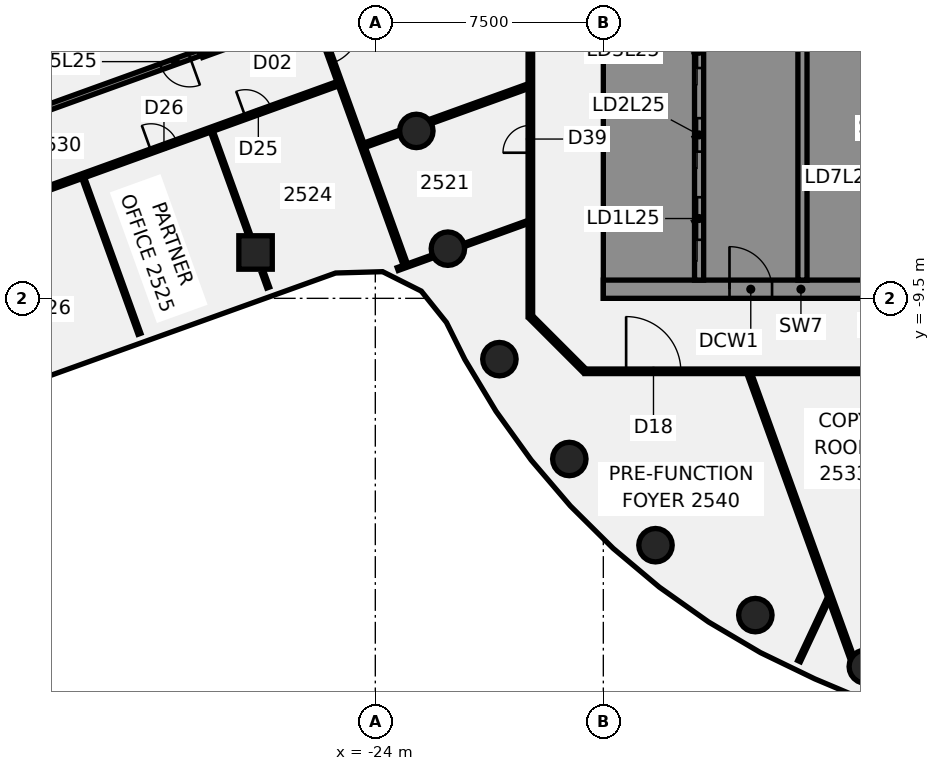
"""IFC4 building model, lengths in metres.
Left out: names, types, materials, properties, quantities, classifications, styles, units other than length and angle.
Written with IfcOpenShell. Run it as: python <this file> out.ifc"""

import sys

from ifc_helpers import new_model, si_unit, direction, frame, frame_2d, origin, origin_2d, place, context, subcontext, project, spatial, polyline, rectangle, circle, outline, extrude, element, fill, save


model = new_model("IFC4")
c1 = context("Model", 3, precision=1e-05, world=origin(), true_north=direction((0.0, 1.0)))
c2 = subcontext(c1, "Body", "Model", "MODEL_VIEW")
j1 = project(units=[si_unit("LENGTHUNIT", "METRE"), si_unit("PLANEANGLEUNIT", "RADIAN")], contexts=[c1])
p1 = place(None, origin())
s1 = spatial("IfcSite", under=j1, at=p1, CompositionType="ELEMENT")
p2 = place(p1, origin())
s2 = spatial("IfcBuilding", under=s1, at=p2, CompositionType="ELEMENT")
p3 = place(p2, frame((0.0, 0.0, 106.0)))
s3 = spatial("IfcBuildingStorey", under=s2, at=p3, CompositionType="ELEMENT", Elevation=106.0)
for number, where, z_axis, x_axis in (
    (1, (-22.651, -3.994, -0.14), (0.0, 0.0, 1.0), (1.0, 0.0, 0.0)),
    (2, (-21.613, -7.866, -0.14), (0.0, 0.0, 1.0), (1.0, 0.0, 0.0)),
    (3, (-19.919, -11.5, -0.14), (0.0, 0.0, 1.0), (1.0, 0.0, 0.0)),
    (4, (-17.619, -14.784, -0.14), (0.0, 0.0, 1.0), (1.0, 0.0, 0.0)),
    (5, (-14.784, -17.619, -0.14), (0.0, 0.0, 1.0), (1.0, 0.0, 0.0)),
    (6, (-11.5, -19.919, -0.14), (0.0, 0.0, 1.0), (1.0, 0.0, 0.0)),
    (7, (-7.866, -21.613, -0.14), (0.0, 0.0, 1.0), (1.0, 0.0, 0.0)),
):
    element("IfcColumn", number, at=place(p3, frame(where, z_axis=z_axis, x_axis=x_axis)), inside=s3, PredefinedType="COLUMN", context=c2, shape_type="SweptSolid", body=[
        extrude(circle(Radius=0.55, at=origin_2d()), origin(), (0.0, 0.0, 1.0), 3.75),
    ])
p4 = place(p3, frame((-27.939, -7.992, -0.139), z_axis=(0.039044792498, -0.028502698523, 0.998830866742), x_axis=(-0.338245964432, 0.940205035525, 0.040051950239)))
e8 = element("IfcColumn", 8, at=p4, inside=s3, PredefinedType="COLUMN", context=c2, shape_type="SweptSolid", body=[
    extrude(rectangle(XDim=1.1, YDim=1.1, at=origin_2d()), origin(), (0.0, 0.0, 1.0), 3.752),
])
p5 = place(p3, frame((-33.606, -5.545, 0.0), z_axis=(0.0, 0.0, 1.0), x_axis=(0.339516614383, -0.940600057707, 0.0)))
e9 = element("IfcWall", 9, at=p5, inside=s3, PredefinedType="PARTITIONING", context=c2, shape_type="SweptSolid", body=[
    extrude(rectangle(XDim=5.443, YDim=0.1, at=frame_2d((2.722, 0.0))), origin(), (0.0, 0.0, 1.0), 3.01),
])
p6 = place(p3, frame((-29.374, -4.018, 0.0), z_axis=(0.0, 0.0, 1.0), x_axis=(0.339511197123, -0.94060201309, 0.0)))
e10 = element("IfcWall", 10, at=p6, inside=s3, PredefinedType="PARTITIONING", context=c2, shape_type="SweptSolid", body=[
    extrude(rectangle(XDim=3.646, YDim=0.1, at=frame_2d((1.823, 0.0))), origin(), (0.0, 0.0, 1.0), 3.01),
])
p7 = place(p3, frame((-27.695, -8.669, 0.0), z_axis=(0.0, 0.0, 1.0), x_axis=(0.339061997741, -0.940764030822, 0.0)))
e11 = element("IfcWall", 11, at=p7, inside=s3, PredefinedType="PARTITIONING", context=c2, shape_type="SweptSolid", body=[
    extrude(rectangle(XDim=0.505, YDim=0.1, at=frame_2d((0.252, 0.0))), origin(), (0.0, 0.0, 1.0), 3.01),
])
p8 = place(p3, frame((-27.849, 5.01, 0.0), z_axis=(0.0, 0.0, 1.0), x_axis=(0.339486516138, -0.940610921349, 0.0)))
e12 = element("IfcWall", 12, at=p8, inside=s3, PredefinedType="PARTITIONING", context=c2, shape_type="SweptSolid", body=[
    extrude(rectangle(XDim=14.244, YDim=0.15, at=frame_2d((7.122, 0.0))), origin(), (0.0, 0.0, 1.0), 3.01),
])
p9 = place(p8, frame((5.799, 0.0, 0.0)))
e13 = element("IfcOpeningElement", 13, at=p9, cuts=e12, PredefinedType="OPENING", context=c2, shape_type="SweptSolid", body=[
    extrude(rectangle(XDim=1.4, YDim=2.1, at=frame_2d((0.7, 1.05))), frame((0.0, 0.085, 0.0), z_axis=(0.0, -1.0, 0.0), x_axis=(1.0, 0.0, 0.0)), (0.0, 0.0, 1.0), 0.17),
])
p10 = place(p3, frame((-11.696, -11.985, 0.0), z_axis=(0.0, 0.0, 1.0), x_axis=(0.339658380715, -0.940548874015, 0.0)))
e14 = element("IfcWall", 14, at=p10, inside=s3, PredefinedType="PARTITIONING", context=c2, shape_type="SweptSolid", body=[
    extrude(rectangle(XDim=9.915, YDim=0.15, at=frame_2d((4.958, 0.0))), origin(), (0.0, 0.0, 1.0), 3.01),
])
p11 = place(p3, frame((-18.872, -10.128, 0.0), z_axis=(0.0, 0.0, 1.0), x_axis=(0.707106781187, -0.707106781187, 0.0)))
e15 = element("IfcWall", 15, at=p11, inside=s3, PredefinedType="PARTITIONING", context=c2, shape_type="SweptSolid", body=[
    extrude(rectangle(XDim=2.465, YDim=0.15, at=frame_2d((1.232, 0.0))), origin(), (0.0, 0.0, 1.0), 3.01),
])
p12 = place(p3, frame((-17.1, -11.9, 0.0), z_axis=(0.0, 0.0, 1.0), x_axis=(1.0, 0.0, 0.0)))
e16 = element("IfcWall", 16, at=p12, inside=s3, PredefinedType="PARTITIONING", context=c2, shape_type="SweptSolid", body=[
    extrude(rectangle(XDim=34.165, YDim=0.15, at=frame_2d((17.083, 0.0))), origin(), (0.0, 0.0, 1.0), 3.01),
])
p13 = place(p12, frame((12.539, 0.0, 0.0)))
e17 = element("IfcOpeningElement", 17, at=p13, cuts=e16, PredefinedType="OPENING", context=c2, shape_type="SweptSolid", body=[
    extrude(rectangle(XDim=1.8, YDim=2.1, at=frame_2d((0.9, 1.05))), frame((0.0, 0.085, 0.0), z_axis=(0.0, -1.0, 0.0), x_axis=(1.0, 0.0, 0.0)), (0.0, 0.0, 1.0), 0.17),
])
p14 = place(p12, frame((1.35, 0.0, 0.0)))
e18 = element("IfcOpeningElement", 18, at=p14, cuts=e16, PredefinedType="OPENING", context=c2, shape_type="SweptSolid", body=[
    extrude(rectangle(XDim=1.8, YDim=2.1, at=frame_2d((0.9, 1.05))), frame((0.0, 0.085, 0.0), z_axis=(0.0, -1.0, 0.0), x_axis=(1.0, 0.0, 0.0)), (0.0, 0.0, 1.0), 0.17),
])
p15 = place(p12, frame((26.934, 0.0, 0.0)))
e19 = element("IfcOpeningElement", 19, at=p15, cuts=e16, PredefinedType="OPENING", context=c2, shape_type="SweptSolid", body=[
    extrude(rectangle(XDim=1.8, YDim=2.1, at=frame_2d((0.9, 1.05))), frame((0.0, 0.085, 0.0), z_axis=(0.0, -1.0, 0.0), x_axis=(1.0, 0.0, 0.0)), (0.0, 0.0, 1.0), 0.17),
])
p16 = place(p3, frame((-29.706, -1.507, 0.0), z_axis=(0.0, 0.0, 1.0), x_axis=(0.940581781259, 0.339567243361, 0.0)))
e20 = element("IfcWall", 20, at=p16, inside=s3, PredefinedType="PARTITIONING", context=c2, shape_type="SweptSolid", body=[
    extrude(rectangle(XDim=3.885, YDim=0.15, at=frame_2d((1.942, 0.0))), origin(), (0.0, 0.0, 1.0), 3.01),
])
p17 = place(p16, frame((1.95, 0.0, 0.0)))
e21 = element("IfcOpeningElement", 21, at=p17, cuts=e20, PredefinedType="OPENING", context=c2, shape_type="SweptSolid", body=[
    extrude(rectangle(XDim=0.9, YDim=2.1, at=frame_2d((0.45, 1.05))), frame((0.0, 0.085, 0.0), z_axis=(0.0, -1.0, 0.0), x_axis=(1.0, 0.0, 0.0)), (0.0, 0.0, 1.0), 0.17),
])
p18 = place(p3, frame((-42.027, -8.507, 0.0), z_axis=(0.0, 0.0, 1.0), x_axis=(0.940523059572, 0.33972985505, 0.0)))
e22 = element("IfcWall", 22, at=p18, inside=s3, PredefinedType="PARTITIONING", context=c2, shape_type="SweptSolid", body=[
    extrude(rectangle(XDim=17.845, YDim=0.15, at=frame_2d((8.922, 0.0))), origin(), (0.0, 0.0, 1.0), 3.01),
])
p19 = place(p18, frame((14.625, 0.0, 0.0)))
e23 = element("IfcOpeningElement", 23, at=p19, cuts=e22, PredefinedType="OPENING", context=c2, shape_type="SweptSolid", body=[
    extrude(rectangle(XDim=0.9, YDim=2.1, at=frame_2d((0.45, 1.05))), frame((0.0, 0.085, 0.0), z_axis=(0.0, -1.0, 0.0), x_axis=(1.0, 0.0, 0.0)), (0.0, 0.0, 1.0), 0.17),
])
p20 = place(p18, frame((11.325, 0.0, 0.0)))
e24 = element("IfcOpeningElement", 24, at=p20, cuts=e22, PredefinedType="OPENING", context=c2, shape_type="SweptSolid", body=[
    extrude(rectangle(XDim=0.9, YDim=2.1, at=frame_2d((0.45, 1.05))), frame((0.0, 0.085, 0.0), z_axis=(0.0, -1.0, 0.0), x_axis=(1.0, 0.0, 0.0)), (0.0, 0.0, 1.0), 0.17),
])
p21 = place(p18, frame((5.626, 0.0, 0.0)))
e25 = element("IfcOpeningElement", 25, at=p21, cuts=e22, PredefinedType="OPENING", context=c2, shape_type="SweptSolid", body=[
    extrude(rectangle(XDim=0.9, YDim=2.1, at=frame_2d((0.45, 1.05))), frame((0.0, 0.085, 0.0), z_axis=(0.0, -1.0, 0.0), x_axis=(1.0, 0.0, 0.0)), (0.0, 0.0, 1.0), 0.17),
])
p22 = place(p18, frame((2.325, 0.0, 0.0)))
e26 = element("IfcOpeningElement", 26, at=p22, cuts=e22, PredefinedType="OPENING", context=c2, shape_type="SweptSolid", body=[
    extrude(rectangle(XDim=0.9, YDim=2.1, at=frame_2d((0.45, 1.05))), frame((0.0, 0.085, 0.0), z_axis=(0.0, -1.0, 0.0), x_axis=(1.0, 0.0, 0.0)), (0.0, 0.0, 1.0), 0.17),
])
p23 = place(p3, frame((-24.35, -4.462, 0.0), z_axis=(0.0, 0.0, 1.0), x_axis=(0.940651064029, 0.33937527273, 0.0)))
e27 = element("IfcWall", 27, at=p23, inside=s3, PredefinedType="PARTITIONING", context=c2, shape_type="SweptSolid", body=[
    extrude(rectangle(XDim=1.226, YDim=0.15, at=frame_2d((0.613, 0.0))), origin(), (0.0, 0.0, 1.0), 3.01),
])
p24 = place(p3, frame((-22.195, -3.685, 0.0), z_axis=(0.0, 0.0, 1.0), x_axis=(0.94064274641, 0.339398325903, 0.0)))
e28 = element("IfcWall", 28, at=p24, inside=s3, PredefinedType="PARTITIONING", context=c2, shape_type="SweptSolid", body=[
    extrude(rectangle(XDim=3.413, YDim=0.15, at=frame_2d((1.706, 0.0))), origin(), (0.0, 0.0, 1.0), 3.01),
])
p25 = place(p3, frame((-23.263, -8.536, 0.0), z_axis=(0.0, 0.0, 1.0), x_axis=(0.940619022918, 0.339464068385, 0.0)))
e29 = element("IfcWall", 29, at=p25, inside=s3, PredefinedType="PARTITIONING", context=c2, shape_type="SweptSolid", body=[
    extrude(rectangle(XDim=1.23, YDim=0.1, at=frame_2d((0.615, 0.0))), origin(), (0.0, 0.0, 1.0), 3.01),
])
p26 = place(p3, frame((-21.084, -7.749, 0.0), z_axis=(0.0, 0.0, 1.0), x_axis=(0.940645654614, 0.339390265706, 0.0)))
e30 = element("IfcWall", 30, at=p26, inside=s3, PredefinedType="PARTITIONING", context=c2, shape_type="SweptSolid", body=[
    extrude(rectangle(XDim=2.242, YDim=0.1, at=frame_2d((1.121, 0.0))), origin(), (0.0, 0.0, 1.0), 3.01),
])
p27 = place(p3, frame((-10.061, -21.432, 0.0), z_axis=(0.0, 0.0, 1.0), x_axis=(0.424984109226, 0.905200810265, 0.0)))
e31 = element("IfcWall", 31, at=p27, inside=s3, PredefinedType="PARTITIONING", context=c2, shape_type="SweptSolid", body=[
    extrude(rectangle(XDim=2.228, YDim=0.1, at=frame_2d((1.114, 0.0))), origin(), (0.0, 0.0, 1.0), 3.01),
])
p28 = place(p3, frame((-18.9, -10.1, 0.0), z_axis=(0.0, 0.0, 1.0), x_axis=(0.0, 1.0, 0.0)))
e32 = element("IfcWall", 32, at=p28, inside=s3, PredefinedType="PARTITIONING", context=c2, shape_type="SweptSolid", body=[
    extrude(rectangle(XDim=20.2, YDim=0.15, at=frame_2d((10.1, 0.0))), origin(), (0.0, 0.0, 1.0), 3.01),
])
p29 = place(p28, frame((9.554, 0.0, 0.0)))
e33 = element("IfcOpeningElement", 33, at=p29, cuts=e32, PredefinedType="OPENING", context=c2, shape_type="SweptSolid", body=[
    extrude(rectangle(XDim=1.8, YDim=2.1, at=frame_2d((0.9, 1.05))), frame((0.0, 0.085, 0.0), z_axis=(0.0, -1.0, 0.0), x_axis=(1.0, 0.0, 0.0)), (0.0, 0.0, 1.0), 0.17),
])
p30 = place(p28, frame((5.389, 0.0, 0.0)))
e34 = element("IfcOpeningElement", 34, at=p30, cuts=e32, PredefinedType="OPENING", context=c2, shape_type="SweptSolid", body=[
    extrude(rectangle(XDim=0.9, YDim=2.1, at=frame_2d((0.45, 1.05))), frame((0.0, 0.085, 0.0), z_axis=(0.0, -1.0, 0.0), x_axis=(1.0, 0.0, 0.0)), (0.0, 0.0, 1.0), 0.17),
])
p31 = place(p3, frame((-16.5, -9.2, 0.0), z_axis=(0.0, 0.0, 1.0), x_axis=(1.0, 0.0, 0.0)))
e35 = element("IfcWall", 35, at=p31, inside=s3, PredefinedType="SHEAR", context=c2, shape_type="SweptSolid", body=[
    extrude(rectangle(XDim=13.0, YDim=0.6, at=frame_2d((6.5, 0.0))), origin(), (0.0, 0.0, 1.0), 3.61),
])
p32 = place(p31, frame((4.15, 0.0, 0.0)))
e36 = element("IfcOpeningElement", 36, at=p32, cuts=e35, PredefinedType="OPENING", context=c2, shape_type="SweptSolid", body=[
    extrude(rectangle(XDim=1.4, YDim=2.1, at=frame_2d((0.7, 1.05))), frame((0.0, 0.31, 0.0), z_axis=(0.0, -1.0, 0.0), x_axis=(1.0, 0.0, 0.0)), (0.0, 0.0, 1.0), 0.62),
])
p33 = place(p31, frame((10.125, 0.0, 0.0)))
e37 = element("IfcOpeningElement", 37, at=p33, cuts=e35, PredefinedType="OPENING", context=c2, shape_type="SweptSolid", body=[
    extrude(rectangle(XDim=1.4, YDim=2.1, at=frame_2d((0.7, 1.05))), frame((0.0, 0.31, 0.0), z_axis=(0.0, -1.0, 0.0), x_axis=(1.0, 0.0, 0.0)), (0.0, 0.0, 1.0), 0.62),
])
p34 = place(p3, origin())
e38 = element("IfcWall", 38, at=p34, inside=s3, PredefinedType="SHEAR", context=c2, shape_type="SweptSolid", body=[
    extrude(outline(polyline([(-13.5, -8.9), (-13.5, -8.125), (-15.9, -8.125), (-15.9, -5.625), (-13.5, -5.625), (-13.5, -5.375), (-15.9, -5.375), (-15.9, -2.875), (-13.5, -2.875), (-13.5, -2.625), (-15.9, -2.625), (-15.9, -0.125), (-13.5, -0.125), (-13.5, 0.125), (-15.9, 0.125), (-15.9, 2.625), (-13.5, 2.625), (-13.5, 2.875), (-15.9, 2.875), (-15.9, 5.375), (-13.5, 5.375), (-13.5, 5.625), (-15.9, 5.625), (-15.9, 8.125), (-13.5, 8.125), (-13.5, 8.9), (-15.9, 8.9), (-16.5, 8.9), (-16.5, -8.9), (-15.9, -8.9), (-13.5, -8.9)])), origin(), (0.0, 0.0, 1.0), 3.61),
])
p35 = place(p3, origin())
e39 = element("IfcWall", 39, at=p35, inside=s3, PredefinedType="SHEAR", context=c2, shape_type="SweptSolid", body=[
    extrude(outline(polyline([(-9.8, -5.375), (-9.8, -5.625), (-7.5, -5.625), (-7.2, -5.625), (-7.2, 8.9), (-7.5, 8.9), (-9.8, 8.9), (-9.8, 8.125), (-7.5, 8.125), (-7.5, 5.625), (-9.8, 5.625), (-9.8, 5.375), (-7.5, 5.375), (-7.5, 2.875), (-9.8, 2.875), (-9.8, 2.625), (-7.5, 2.625), (-7.5, 0.125), (-9.8, 0.125), (-9.8, -0.125), (-7.5, -0.125), (-7.5, -2.625), (-9.8, -2.625), (-9.8, -2.875), (-7.5, -2.875), (-7.5, -5.375), (-9.8, -5.375)])), origin(), (0.0, 0.0, 1.0), 3.61),
])
p36 = place(p3, origin())
e40 = element("IfcWall", 40, at=p36, inside=s3, PredefinedType="SHEAR", context=c2, shape_type="SweptSolid", body=[
    extrude(outline(polyline([(-7.5, -8.125), (-9.55, -8.125), (-9.55, -5.625), (-9.8, -5.625), (-9.8, -8.125), (-9.8, -8.9), (-7.5, -8.9), (-7.5, -8.125)])), origin(), (0.0, 0.0, 1.0), 3.61),
])
p37 = place(p3, frame((-13.35, -8.9, 0.0), z_axis=(0.0, 0.0, 1.0), x_axis=(0.0, 1.0, 0.0)))
e41 = element("IfcWall", 41, at=p37, inside=s3, PredefinedType="SHEAR", context=c2, shape_type="SweptSolid", body=[
    extrude(rectangle(XDim=17.8, YDim=0.3, at=frame_2d((8.9, 0.0))), origin(), (0.0, 0.0, 1.0), 3.61),
])
p38 = place(p37, frame((1.325, 0.0, 0.0)))
e42 = element("IfcOpeningElement", 42, at=p38, cuts=e41, PredefinedType="OPENING", context=c2, shape_type="SweptSolid", body=[
    extrude(rectangle(XDim=1.4, YDim=2.1, at=frame_2d((0.7, 1.05))), frame((0.0, 0.16, 0.0), z_axis=(0.0, -1.0, 0.0), x_axis=(1.0, 0.0, 0.0)), (0.0, 0.0, 1.0), 0.32),
])
p39 = place(p37, frame((4.225, 0.0, 0.0)))
e43 = element("IfcOpeningElement", 43, at=p39, cuts=e41, PredefinedType="OPENING", context=c2, shape_type="SweptSolid", body=[
    extrude(rectangle(XDim=1.1, YDim=2.1, at=frame_2d((0.55, 1.05))), frame((0.0, 0.16, 0.0), z_axis=(0.0, -1.0, 0.0), x_axis=(1.0, 0.0, 0.0)), (0.0, 0.0, 1.0), 0.32),
])
p40 = place(p37, frame((6.975, 0.0, 0.0)))
e44 = element("IfcOpeningElement", 44, at=p40, cuts=e41, PredefinedType="OPENING", context=c2, shape_type="SweptSolid", body=[
    extrude(rectangle(XDim=1.1, YDim=2.1, at=frame_2d((0.55, 1.05))), frame((0.0, 0.16, 0.0), z_axis=(0.0, -1.0, 0.0), x_axis=(1.0, 0.0, 0.0)), (0.0, 0.0, 1.0), 0.32),
])
p41 = place(p37, frame((9.725, 0.0, 0.0)))
e45 = element("IfcOpeningElement", 45, at=p41, cuts=e41, PredefinedType="OPENING", context=c2, shape_type="SweptSolid", body=[
    extrude(rectangle(XDim=1.1, YDim=2.1, at=frame_2d((0.55, 1.05))), frame((0.0, 0.16, 0.0), z_axis=(0.0, -1.0, 0.0), x_axis=(1.0, 0.0, 0.0)), (0.0, 0.0, 1.0), 0.32),
])
p42 = place(p37, frame((12.475, 0.0, 0.0)))
e46 = element("IfcOpeningElement", 46, at=p42, cuts=e41, PredefinedType="OPENING", context=c2, shape_type="SweptSolid", body=[
    extrude(rectangle(XDim=1.1, YDim=2.1, at=frame_2d((0.55, 1.05))), frame((0.0, 0.16, 0.0), z_axis=(0.0, -1.0, 0.0), x_axis=(1.0, 0.0, 0.0)), (0.0, 0.0, 1.0), 0.32),
])
p43 = place(p3, frame((-9.95, -8.9, 0.0), z_axis=(0.0, 0.0, 1.0), x_axis=(0.0, 1.0, 0.0)))
e47 = element("IfcWall", 47, at=p43, inside=s3, PredefinedType="SHEAR", context=c2, shape_type="SweptSolid", body=[
    extrude(rectangle(XDim=17.8, YDim=0.3, at=frame_2d((8.9, 0.0))), origin(), (0.0, 0.0, 1.0), 3.61),
])
p44 = place(p3, frame((-29.778, -1.426, -0.14), z_axis=(0.0, 0.0, 1.0), x_axis=(-0.940577178985, -0.339579991126, 0.0)))
e48 = element("IfcWall", 48, at=p44, inside=s3, PredefinedType="SHEAR", context=c2, shape_type="SweptSolid", body=[
    extrude(rectangle(XDim=6.7, YDim=0.2, at=frame_2d((3.35, 0.0))), origin(), (0.0, 0.0, 1.0), 3.15),
])
p45 = place(p44, frame((0.35, 0.0, 0.0)))
e49 = element("IfcOpeningElement", 49, at=p45, cuts=e48, PredefinedType="OPENING", context=c2, shape_type="SweptSolid", body=[
    extrude(rectangle(XDim=1.0, YDim=2.1, at=frame_2d((0.5, 1.05))), frame((0.0, 0.11, 0.0), z_axis=(0.0, -1.0, 0.0), x_axis=(1.0, 0.0, 0.0)), (0.0, 0.0, 1.0), 0.22),
])
p46 = place(p9, origin())
e50 = element("IfcDoor", 50, at=p46, inside=s3, OperationType="DOUBLE_DOOR_SINGLE_SWING", PredefinedType="DOOR", context=c2, shape_type="SweptSolid", body=[
    extrude(rectangle(XDim=1.4, YDim=2.1, at=frame_2d((0.7, 1.05))), frame((0.0, 0.025, 0.0), z_axis=(0.0, -1.0, 0.0), x_axis=(1.0, 0.0, 0.0)), (0.0, 0.0, 1.0), 0.05),
])
fill(e13, e50)
p47 = place(p14, frame((1.8, 0.0, 0.0), z_axis=(0.0, 0.0, 1.0), x_axis=(-1.0, 0.0, 0.0)))
e51 = element("IfcDoor", 51, at=p47, inside=s3, OperationType="DOUBLE_DOOR_SINGLE_SWING", PredefinedType="DOOR", context=c2, shape_type="SweptSolid", body=[
    extrude(rectangle(XDim=1.8, YDim=2.1, at=frame_2d((0.9, 1.05))), frame((0.0, 0.025, 0.0), z_axis=(0.0, -1.0, 0.0), x_axis=(1.0, 0.0, 0.0)), (0.0, 0.0, 1.0), 0.05),
])
fill(e18, e51)
p48 = place(p19, frame((0.9, 0.0, 0.0), z_axis=(0.0, 0.0, 1.0), x_axis=(-1.0, 0.0, 0.0)))
e52 = element("IfcDoor", 52, at=p48, inside=s3, OperationType="SINGLE_SWING_RIGHT", PredefinedType="DOOR", context=c2, shape_type="SweptSolid", body=[
    extrude(rectangle(XDim=0.9, YDim=2.1, at=frame_2d((0.45, 1.05))), frame((0.0, 0.025, 0.0), z_axis=(0.0, -1.0, 0.0), x_axis=(1.0, 0.0, 0.0)), (0.0, 0.0, 1.0), 0.05),
])
fill(e23, e52)
p49 = place(p20, frame((0.9, 0.0, 0.0), z_axis=(0.0, 0.0, 1.0), x_axis=(-1.0, 0.0, 0.0)))
e53 = element("IfcDoor", 53, at=p49, inside=s3, OperationType="SINGLE_SWING_RIGHT", PredefinedType="DOOR", context=c2, shape_type="SweptSolid", body=[
    extrude(rectangle(XDim=0.9, YDim=2.1, at=frame_2d((0.45, 1.05))), frame((0.0, 0.025, 0.0), z_axis=(0.0, -1.0, 0.0), x_axis=(1.0, 0.0, 0.0)), (0.0, 0.0, 1.0), 0.05),
])
fill(e24, e53)
p50 = place(p30, origin())
e54 = element("IfcDoor", 54, at=p50, inside=s3, OperationType="SINGLE_SWING_RIGHT", PredefinedType="DOOR", context=c2, shape_type="SweptSolid", body=[
    extrude(rectangle(XDim=0.9, YDim=2.1, at=frame_2d((0.45, 1.05))), frame((0.0, 0.025, 0.0), z_axis=(0.0, -1.0, 0.0), x_axis=(1.0, 0.0, 0.0)), (0.0, 0.0, 1.0), 0.05),
])
fill(e34, e54)
p51 = place(p32, origin())
e55 = element("IfcDoor", 55, at=p51, inside=s3, OperationType="SINGLE_SWING_LEFT", PredefinedType="DOOR", context=c2, shape_type="SweptSolid", body=[
    extrude(rectangle(XDim=1.4, YDim=2.1, at=frame_2d((0.7, 1.05))), frame((0.0, 0.025, 0.0), z_axis=(0.0, -1.0, 0.0), x_axis=(1.0, 0.0, 0.0)), (0.0, 0.0, 1.0), 0.05),
])
fill(e36, e55)
p52 = place(p38, origin())
e56 = element("IfcDoor", 56, at=p52, inside=s3, OperationType="SLIDING_TO_LEFT", PredefinedType="DOOR", context=c2, shape_type="SweptSolid", body=[
    extrude(rectangle(XDim=1.4, YDim=2.1, at=frame_2d((0.7, 1.05))), frame((0.0, 0.025, 0.0), z_axis=(0.0, -1.0, 0.0), x_axis=(1.0, 0.0, 0.0)), (0.0, 0.0, 1.0), 0.05),
])
fill(e42, e56)
p53 = place(p39, origin())
e57 = element("IfcDoor", 57, at=p53, inside=s3, OperationType="SLIDING_TO_LEFT", PredefinedType="DOOR", context=c2, shape_type="SweptSolid", body=[
    extrude(rectangle(XDim=1.1, YDim=2.1, at=frame_2d((0.55, 1.05))), frame((0.0, 0.025, 0.0), z_axis=(0.0, -1.0, 0.0), x_axis=(1.0, 0.0, 0.0)), (0.0, 0.0, 1.0), 0.05),
])
fill(e43, e57)
p54 = place(p40, origin())
e58 = element("IfcDoor", 58, at=p54, inside=s3, OperationType="SLIDING_TO_LEFT", PredefinedType="DOOR", context=c2, shape_type="SweptSolid", body=[
    extrude(rectangle(XDim=1.1, YDim=2.1, at=frame_2d((0.55, 1.05))), frame((0.0, 0.025, 0.0), z_axis=(0.0, -1.0, 0.0), x_axis=(1.0, 0.0, 0.0)), (0.0, 0.0, 1.0), 0.05),
])
fill(e44, e58)
p55 = place(p45, origin())
e59 = element("IfcDoor", 59, at=p55, inside=s3, OperationType="SINGLE_SWING_LEFT", PredefinedType="DOOR", context=c2, shape_type="SweptSolid", body=[
    extrude(rectangle(XDim=1.0, YDim=2.1, at=frame_2d((0.5, 1.05))), frame((0.0, 0.025, 0.0), z_axis=(0.0, -1.0, 0.0), x_axis=(1.0, 0.0, 0.0)), (0.0, 0.0, 1.0), 0.05),
])
fill(e49, e59)
save(model, sys.argv[1])
